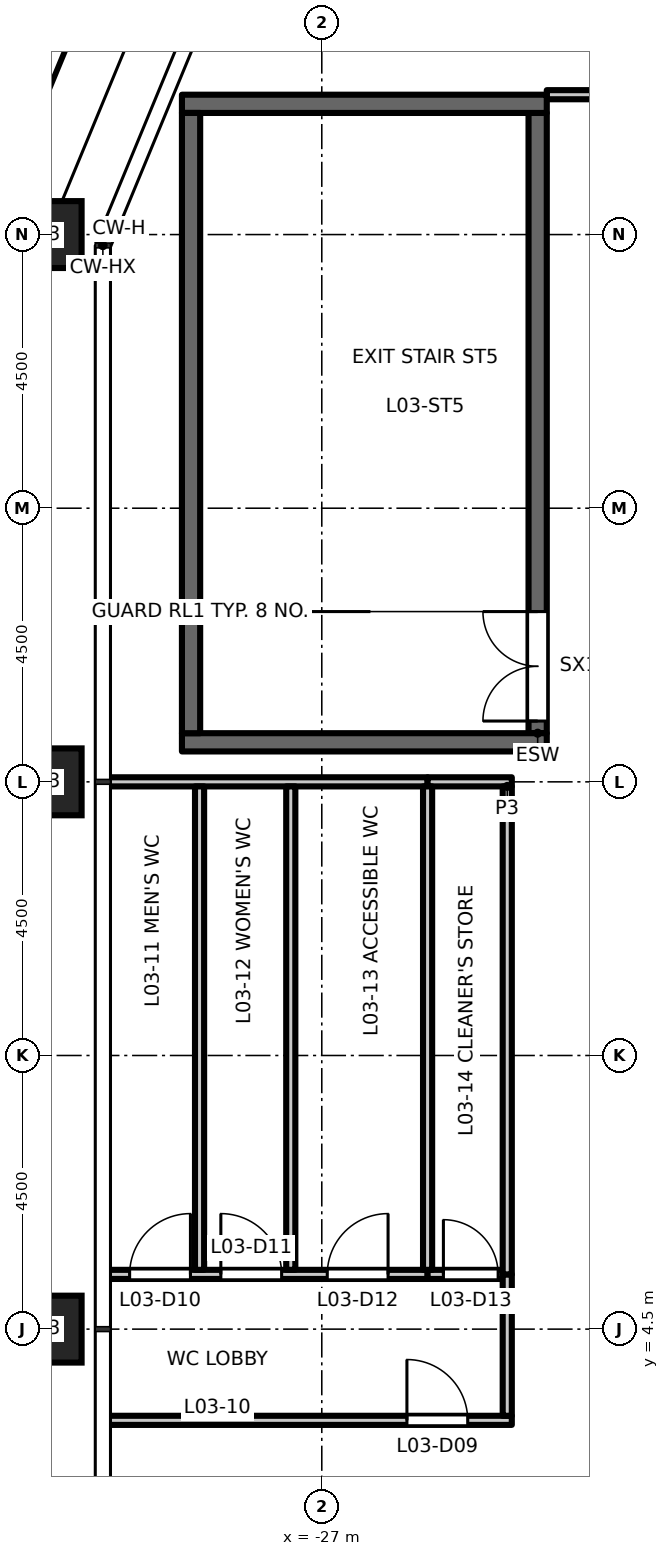
"""IFC4 building model, lengths in metres.
Left out: names, types, materials, properties, quantities, classifications, styles, units other than length and angle.
Written with IfcOpenShell. Run it as: python <this file> out.ifc"""

import sys

from ifc_helpers import new_model, si_unit, direction, frame, frame_2d, origin, origin_2d, place, context, subcontext, project, spatial, rectangle, hollow_rectangle, extrude, element, fill, save


model = new_model("IFC4")
c1 = context("Model", 3, precision=1e-05, world=origin(), true_north=direction((0.0, 1.0)))
c2 = subcontext(c1, "Body", "Model", "MODEL_VIEW")
j1 = project(units=[si_unit("LENGTHUNIT", "METRE"), si_unit("PLANEANGLEUNIT", "RADIAN")], contexts=[c1])
p1 = place(None, origin())
s1 = spatial("IfcSite", under=j1, at=p1, CompositionType="ELEMENT")
p2 = place(p1, origin())
s2 = spatial("IfcBuilding", under=s1, at=p2, CompositionType="ELEMENT")
p3 = place(p2, frame((0.0, 0.0, 17.2)))
s3 = spatial("IfcBuildingStorey", under=s2, at=p3, CompositionType="ELEMENT", Elevation=17.2)
for number, where, z_axis, x_axis in (
    (1, (-31.5, 22.5, 0.0), (0.0, 0.0, 1.0), (1.0, 0.0, 0.0)),
    (2, (-31.5, 13.5, 0.0), (0.0, 0.0, 1.0), (1.0, 0.0, 0.0)),
    (3, (-31.5, 4.5, 0.0), (0.0, 0.0, 1.0), (1.0, 0.0, 0.0)),
):
    element("IfcColumn", number, at=place(p3, frame(where, z_axis=z_axis, x_axis=x_axis)), inside=s3, PredefinedType="COLUMN", context=c2, shape_type="SweptSolid", body=[
        extrude(hollow_rectangle(XDim=1.1, YDim=1.1, WallThickness=0.07, at=origin_2d()), origin(), (0.0, 0.0, 1.0), 5.0),
    ])
p4 = place(p3, frame((-23.45, 14.3, 0.0), z_axis=(0.0, 0.0, 1.0), x_axis=(0.0, 1.0, 0.0)))
e4 = element("IfcWall", 4, at=p4, inside=s3, PredefinedType="SHEAR", context=c2, shape_type="SweptSolid", body=[
    extrude(rectangle(XDim=10.2, YDim=0.3, at=frame_2d((5.1, 0.0))), origin(), (0.0, 0.0, 1.0), 4.85),
])
p5 = place(p4, frame((0.2, 0.0, 0.0)))
e5 = element("IfcOpeningElement", 5, at=p5, cuts=e4, PredefinedType="OPENING", context=c2, shape_type="SweptSolid", body=[
    extrude(rectangle(XDim=1.8, YDim=2.1, at=frame_2d((0.9, 1.05))), frame((0.0, 0.16, 0.0), z_axis=(0.0, -1.0, 0.0), x_axis=(1.0, 0.0, 0.0)), (0.0, 0.0, 1.0), 0.32),
])
for number, where, z_axis, x_axis in (
    (6, (-29.3, 24.65, 0.0), (0.0, 0.0, 1.0), (1.0, 0.0, 0.0)),
    (7, (-29.3, 14.15, 0.0), (0.0, 0.0, 1.0), (1.0, 0.0, 0.0)),
):
    element("IfcWall", number, at=place(p3, frame(where, z_axis=z_axis, x_axis=x_axis)), inside=s3, PredefinedType="SHEAR", context=c2, shape_type="SweptSolid", body=[
        extrude(rectangle(XDim=6.0, YDim=0.3, at=frame_2d((3.0, 0.0))), origin(), (0.0, 0.0, 1.0), 4.85),
    ])
p6 = place(p3, frame((-29.15, 14.3, 0.0), z_axis=(0.0, 0.0, 1.0), x_axis=(0.0, 1.0, 0.0)))
e8 = element("IfcWall", 8, at=p6, inside=s3, PredefinedType="SHEAR", context=c2, shape_type="SweptSolid", body=[
    extrude(rectangle(XDim=10.2, YDim=0.3, at=frame_2d((5.1, 0.0))), origin(), (0.0, 0.0, 1.0), 4.85),
])
p7 = place(p3, frame((-30.51, 3.0, 0.0), z_axis=(0.0, 0.0, 1.0), x_axis=(1.0, 0.0, 0.0)))
e9 = element("IfcWall", 9, at=p7, inside=s3, PredefinedType="PARTITIONING", context=c2, shape_type="SweptSolid", body=[
    extrude(rectangle(XDim=6.635, YDim=0.15, at=frame_2d((3.317, 0.0))), origin(), (0.0, 0.0, 1.0), 4.85),
])
p8 = place(p7, frame((4.91, 0.0, 0.0)))
e10 = element("IfcOpeningElement", 10, at=p8, cuts=e9, PredefinedType="OPENING", context=c2, shape_type="SweptSolid", body=[
    extrude(rectangle(XDim=1.0, YDim=2.1, at=frame_2d((0.5, 1.05))), frame((0.0, 0.085, 0.0), z_axis=(0.0, -1.0, 0.0), x_axis=(1.0, 0.0, 0.0)), (0.0, 0.0, 1.0), 0.17),
])
p9 = place(p3, frame((-30.51, 5.4, 0.0), z_axis=(0.0, 0.0, 1.0), x_axis=(1.0, 0.0, 0.0)))
e11 = element("IfcWall", 11, at=p9, inside=s3, PredefinedType="PARTITIONING", context=c2, shape_type="SweptSolid", body=[
    extrude(rectangle(XDim=5.25, YDim=0.15, at=frame_2d((2.625, 0.0))), origin(), (0.0, 0.0, 1.0), 4.85),
])
p10 = place(p9, frame((0.35, 0.0, 0.0)))
e12 = element("IfcOpeningElement", 12, at=p10, cuts=e11, PredefinedType="OPENING", context=c2, shape_type="SweptSolid", body=[
    extrude(rectangle(XDim=1.0, YDim=2.1, at=frame_2d((0.5, 1.05))), frame((0.0, 0.085, 0.0), z_axis=(0.0, -1.0, 0.0), x_axis=(1.0, 0.0, 0.0)), (0.0, 0.0, 1.0), 0.17),
])
p11 = place(p9, frame((1.85, 0.0, 0.0)))
e13 = element("IfcOpeningElement", 13, at=p11, cuts=e11, PredefinedType="OPENING", context=c2, shape_type="SweptSolid", body=[
    extrude(rectangle(XDim=1.0, YDim=2.1, at=frame_2d((0.5, 1.05))), frame((0.0, 0.085, 0.0), z_axis=(0.0, -1.0, 0.0), x_axis=(1.0, 0.0, 0.0)), (0.0, 0.0, 1.0), 0.17),
])
p12 = place(p9, frame((3.6, 0.0, 0.0)))
e14 = element("IfcOpeningElement", 14, at=p12, cuts=e11, PredefinedType="OPENING", context=c2, shape_type="SweptSolid", body=[
    extrude(rectangle(XDim=1.0, YDim=2.1, at=frame_2d((0.5, 1.05))), frame((0.0, 0.085, 0.0), z_axis=(0.0, -1.0, 0.0), x_axis=(1.0, 0.0, 0.0)), (0.0, 0.0, 1.0), 0.17),
])
p13 = place(p3, frame((-25.26, 5.4, 0.0), z_axis=(0.0, 0.0, 1.0), x_axis=(1.0, 0.0, 0.0)))
e15 = element("IfcWall", 15, at=p13, inside=s3, PredefinedType="PARTITIONING", context=c2, shape_type="SweptSolid", body=[
    extrude(rectangle(XDim=1.235, YDim=0.15, at=frame_2d((0.618, 0.0))), origin(), (0.0, 0.0, 1.0), 4.85),
])
p14 = place(p13, frame((0.26, 0.0, 0.0)))
e16 = element("IfcOpeningElement", 16, at=p14, cuts=e15, PredefinedType="OPENING", context=c2, shape_type="SweptSolid", body=[
    extrude(rectangle(XDim=0.9, YDim=2.1, at=frame_2d((0.45, 1.05))), frame((0.0, 0.085, 0.0), z_axis=(0.0, -1.0, 0.0), x_axis=(1.0, 0.0, 0.0)), (0.0, 0.0, 1.0), 0.17),
])
p15 = place(p3, frame((-30.51, 13.5, 0.0), z_axis=(0.0, 0.0, 1.0), x_axis=(1.0, 0.0, 0.0)))
e17 = element("IfcWall", 17, at=p15, inside=s3, PredefinedType="PARTITIONING", context=c2, shape_type="SweptSolid", body=[
    extrude(rectangle(XDim=5.25, YDim=0.15, at=frame_2d((2.625, 0.0))), origin(), (0.0, 0.0, 1.0), 3.85),
])
p16 = place(p3, frame((-25.26, 13.5, 0.0), z_axis=(0.0, 0.0, 1.0), x_axis=(1.0, 0.0, 0.0)))
e18 = element("IfcWall", 18, at=p16, inside=s3, PredefinedType="PARTITIONING", context=c2, shape_type="SweptSolid", body=[
    extrude(rectangle(XDim=1.385, YDim=0.15, at=frame_2d((0.692, 0.0))), origin(), (0.0, 0.0, 1.0), 3.85),
])
p17 = place(p3, frame((-23.3, 24.8, 0.0), z_axis=(0.0, 0.0, 1.0), x_axis=(1.0, 0.0, 0.0)))
e19 = element("IfcWall", 19, at=p17, inside=s3, PredefinedType="PARTITIONING", context=c2, shape_type="SweptSolid", body=[
    extrude(rectangle(XDim=9.25, YDim=0.15, at=frame_2d((4.625, 0.0))), origin(), (0.0, 0.0, 1.0), 4.85),
])
p18 = place(p17, frame((7.65, 0.0, 0.0)))
e20 = element("IfcOpeningElement", 20, at=p18, cuts=e19, PredefinedType="OPENING", context=c2, shape_type="SweptSolid", body=[
    extrude(rectangle(XDim=1.0, YDim=2.1, at=frame_2d((0.5, 1.05))), frame((0.0, 0.085, 0.0), z_axis=(0.0, -1.0, 0.0), x_axis=(1.0, 0.0, 0.0)), (0.0, 0.0, 1.0), 0.17),
])
for number, where, z_axis, x_axis in (
    (21, (-29.01, 5.475, 0.0), (0.0, 0.0, 1.0), (0.0, 1.0, 0.0)),
    (22, (-27.51, 5.475, 0.0), (0.0, 0.0, 1.0), (0.0, 1.0, 0.0)),
    (23, (-25.26, 5.475, 0.0), (0.0, 0.0, 1.0), (0.0, 1.0, 0.0)),
):
    element("IfcWall", number, at=place(p3, frame(where, z_axis=z_axis, x_axis=x_axis)), inside=s3, PredefinedType="PARTITIONING", context=c2, shape_type="SweptSolid", body=[
        extrude(rectangle(XDim=7.95, YDim=0.15, at=frame_2d((3.975, 0.0))), origin(), (0.0, 0.0, 1.0), 4.85),
    ])
p19 = place(p3, frame((-23.95, 3.075, 0.0), z_axis=(0.0, 0.0, 1.0), x_axis=(0.0, 1.0, 0.0)))
e24 = element("IfcWall", 24, at=p19, inside=s3, PredefinedType="PARTITIONING", context=c2, shape_type="SweptSolid", body=[
    extrude(rectangle(XDim=2.325, YDim=0.15, at=frame_2d((1.163, 0.0))), origin(), (0.0, 0.0, 1.0), 4.85),
])
p20 = place(p3, frame((-23.95, 5.4, 0.0), z_axis=(0.0, 0.0, 1.0), x_axis=(0.0, 1.0, 0.0)))
e25 = element("IfcWall", 25, at=p20, inside=s3, PredefinedType="PARTITIONING", context=c2, shape_type="SweptSolid", body=[
    extrude(rectangle(XDim=8.025, YDim=0.15, at=frame_2d((4.013, 0.0))), origin(), (0.0, 0.0, 1.0), 4.85),
])
p21 = place(p5, origin())
e26 = element("IfcDoor", 26, at=p21, inside=s3, OperationType="DOUBLE_DOOR_SINGLE_SWING", PredefinedType="DOOR", context=c2, shape_type="SweptSolid", body=[
    extrude(rectangle(XDim=1.8, YDim=2.1, at=frame_2d((0.9, 1.05))), frame((0.0, 0.025, 0.0), z_axis=(0.0, -1.0, 0.0), x_axis=(1.0, 0.0, 0.0)), (0.0, 0.0, 1.0), 0.05),
])
fill(e5, e26)
p22 = place(p8, origin())
e27 = element("IfcDoor", 27, at=p22, inside=s3, OperationType="SINGLE_SWING_LEFT", PredefinedType="DOOR", context=c2, shape_type="SweptSolid", body=[
    extrude(rectangle(XDim=1.0, YDim=2.1, at=frame_2d((0.5, 1.05))), frame((0.0, 0.025, 0.0), z_axis=(0.0, -1.0, 0.0), x_axis=(1.0, 0.0, 0.0)), (0.0, 0.0, 1.0), 0.05),
])
fill(e10, e27)
p23 = place(p10, origin())
e28 = element("IfcDoor", 28, at=p23, inside=s3, OperationType="SINGLE_SWING_RIGHT", PredefinedType="DOOR", context=c2, shape_type="SweptSolid", body=[
    extrude(rectangle(XDim=1.0, YDim=2.1, at=frame_2d((0.5, 1.05))), frame((0.0, 0.025, 0.0), z_axis=(0.0, -1.0, 0.0), x_axis=(1.0, 0.0, 0.0)), (0.0, 0.0, 1.0), 0.05),
])
fill(e12, e28)
p24 = place(p11, origin())
e29 = element("IfcDoor", 29, at=p24, inside=s3, OperationType="SINGLE_SWING_LEFT", PredefinedType="DOOR", context=c2, shape_type="SweptSolid", body=[
    extrude(rectangle(XDim=1.0, YDim=2.1, at=frame_2d((0.5, 1.05))), frame((0.0, 0.025, 0.0), z_axis=(0.0, -1.0, 0.0), x_axis=(1.0, 0.0, 0.0)), (0.0, 0.0, 1.0), 0.05),
])
fill(e13, e29)
p25 = place(p12, origin())
e30 = element("IfcDoor", 30, at=p25, inside=s3, OperationType="SINGLE_SWING_RIGHT", PredefinedType="DOOR", context=c2, shape_type="SweptSolid", body=[
    extrude(rectangle(XDim=1.0, YDim=2.1, at=frame_2d((0.5, 1.05))), frame((0.0, 0.025, 0.0), z_axis=(0.0, -1.0, 0.0), x_axis=(1.0, 0.0, 0.0)), (0.0, 0.0, 1.0), 0.05),
])
fill(e14, e30)
p26 = place(p14, origin())
e31 = element("IfcDoor", 31, at=p26, inside=s3, OperationType="SINGLE_SWING_LEFT", PredefinedType="DOOR", context=c2, shape_type="SweptSolid", body=[
    extrude(rectangle(XDim=0.9, YDim=2.1, at=frame_2d((0.45, 1.05))), frame((0.0, 0.025, 0.0), z_axis=(0.0, -1.0, 0.0), x_axis=(1.0, 0.0, 0.0)), (0.0, 0.0, 1.0), 0.05),
])
fill(e16, e31)
save(model, sys.argv[1])
